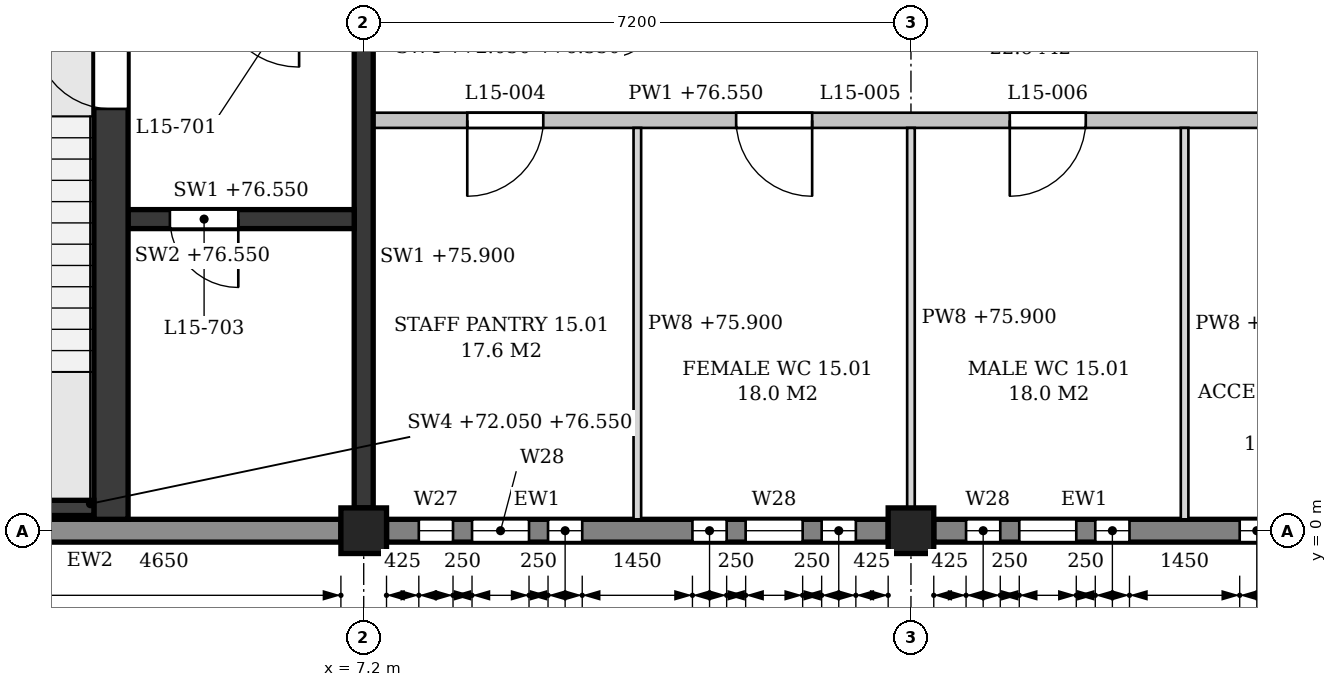
"""IFC4 building model, lengths in metres.
Left out: names, types, materials, properties, quantities, classifications, styles, units other than length and angle.
Written with IfcOpenShell. Run it as: python <this file> out.ifc"""

import sys

from ifc_helpers import new_model, si_unit, direction, frame, frame_2d, origin, origin_2d, place, context, subcontext, project, spatial, polyline, rectangle, outline, extrude, element, fill, save


model = new_model("IFC4")
c1 = context("Model", 3, precision=1e-05, world=origin(), true_north=direction((0.0, 1.0)))
c2 = subcontext(c1, "Body", "Model", "MODEL_VIEW")
j1 = project(units=[si_unit("LENGTHUNIT", "METRE"), si_unit("PLANEANGLEUNIT", "RADIAN")], contexts=[c1])
p1 = place(None, origin())
s1 = spatial("IfcSite", under=j1, at=p1, CompositionType="ELEMENT")
p2 = place(p1, origin())
s2 = spatial("IfcBuilding", under=s1, at=p2, CompositionType="ELEMENT")
p3 = place(p2, frame((0.0, 0.0, 72.3)))
s3 = spatial("IfcBuildingStorey", under=s2, at=p3, CompositionType="ELEMENT", Elevation=72.3)
for number, where, z_axis, x_axis in (
    (1, (7.2, 0.0, 0.0), (0.0, 0.0, 1.0), (1.0, 0.0, 0.0)),
    (2, (14.4, 0.0, 0.0), (0.0, 0.0, 1.0), (1.0, 0.0, 0.0)),
):
    element("IfcColumn", number, at=place(p3, frame(where, z_axis=z_axis, x_axis=x_axis)), inside=s3, PredefinedType="COLUMN", context=c2, shape_type="SweptSolid", body=[
        extrude(rectangle(XDim=0.6, YDim=0.6, at=origin_2d()), origin(), (0.0, 0.0, 1.0), 4.5),
    ])
p4 = place(p3, frame((0.3, 0.0, 0.0), z_axis=(0.0, 0.0, 1.0), x_axis=(1.0, 0.0, 0.0)))
e3 = element("IfcWall", 3, at=p4, inside=s3, PredefinedType="STANDARD", context=c2, shape_type="SweptSolid", body=[
    extrude(rectangle(XDim=6.6, YDim=0.3, at=frame_2d((3.3, 0.0))), origin(), (0.0, 0.0, 1.0), 3.65),
])
p5 = place(p4, frame((1.05, 0.0, 0.9)))
e4 = element("IfcOpeningElement", 4, at=p5, cuts=e3, PredefinedType="OPENING", context=c2, shape_type="SweptSolid", body=[
    extrude(outline(polyline([(0.0, 0.0), (0.9, 0.0), (0.9, 2.25), (0.45, 2.7), (0.0, 2.25), (0.0, 0.0)])), frame((0.0, 0.16, 0.0), z_axis=(0.0, -1.0, 0.0), x_axis=(1.0, 0.0, 0.0)), (0.0, 0.0, 1.0), 0.32),
])
p6 = place(p3, frame((7.5, 0.0, 0.0), z_axis=(0.0, 0.0, 1.0), x_axis=(1.0, 0.0, 0.0)))
e5 = element("IfcWall", 5, at=p6, inside=s3, PredefinedType="STANDARD", context=c2, shape_type="SweptSolid", body=[
    extrude(rectangle(XDim=6.6, YDim=0.3, at=frame_2d((3.3, 0.0))), origin(), (0.0, 0.0, 1.0), 3.65),
])
p7 = place(p6, frame((0.425, 0.0, 1.5)))
e6 = element("IfcOpeningElement", 6, at=p7, cuts=e5, PredefinedType="OPENING", context=c2, shape_type="SweptSolid", body=[
    extrude(outline(polyline([(0.0, 0.0), (0.45, 0.0), (0.45, 1.85), (0.225, 2.1), (0.0, 1.85), (0.0, 0.0)])), frame((0.0, 0.16, 0.0), z_axis=(0.0, -1.0, 0.0), x_axis=(1.0, 0.0, 0.0)), (0.0, 0.0, 1.0), 0.32),
])
p8 = place(p6, frame((1.125, 0.0, 0.9)))
e7 = element("IfcOpeningElement", 7, at=p8, cuts=e5, PredefinedType="OPENING", context=c2, shape_type="SweptSolid", body=[
    extrude(outline(polyline([(0.0, 0.0), (0.75, 0.0), (0.75, 2.25), (0.375, 2.7), (0.0, 2.25), (0.0, 0.0)])), frame((0.0, 0.16, 0.0), z_axis=(0.0, -1.0, 0.0), x_axis=(1.0, 0.0, 0.0)), (0.0, 0.0, 1.0), 0.32),
])
p9 = place(p6, frame((2.125, 0.0, 1.5)))
e8 = element("IfcOpeningElement", 8, at=p9, cuts=e5, PredefinedType="OPENING", context=c2, shape_type="SweptSolid", body=[
    extrude(outline(polyline([(0.0, 0.0), (0.45, 0.0), (0.45, 1.85), (0.225, 2.1), (0.0, 1.85), (0.0, 0.0)])), frame((0.0, 0.16, 0.0), z_axis=(0.0, -1.0, 0.0), x_axis=(1.0, 0.0, 0.0)), (0.0, 0.0, 1.0), 0.32),
])
p10 = place(p6, frame((4.025, 0.0, 1.5)))
e9 = element("IfcOpeningElement", 9, at=p10, cuts=e5, PredefinedType="OPENING", context=c2, shape_type="SweptSolid", body=[
    extrude(outline(polyline([(0.0, 0.0), (0.45, 0.0), (0.45, 1.85), (0.225, 2.1), (0.0, 1.85), (0.0, 0.0)])), frame((0.0, 0.16, 0.0), z_axis=(0.0, -1.0, 0.0), x_axis=(1.0, 0.0, 0.0)), (0.0, 0.0, 1.0), 0.32),
])
p11 = place(p6, frame((4.725, 0.0, 0.9)))
e10 = element("IfcOpeningElement", 10, at=p11, cuts=e5, PredefinedType="OPENING", context=c2, shape_type="SweptSolid", body=[
    extrude(outline(polyline([(0.0, 0.0), (0.75, 0.0), (0.75, 2.25), (0.375, 2.7), (0.0, 2.25), (0.0, 0.0)])), frame((0.0, 0.16, 0.0), z_axis=(0.0, -1.0, 0.0), x_axis=(1.0, 0.0, 0.0)), (0.0, 0.0, 1.0), 0.32),
])
p12 = place(p6, frame((5.725, 0.0, 1.5)))
e11 = element("IfcOpeningElement", 11, at=p12, cuts=e5, PredefinedType="OPENING", context=c2, shape_type="SweptSolid", body=[
    extrude(outline(polyline([(0.0, 0.0), (0.45, 0.0), (0.45, 1.85), (0.225, 2.1), (0.0, 1.85), (0.0, 0.0)])), frame((0.0, 0.16, 0.0), z_axis=(0.0, -1.0, 0.0), x_axis=(1.0, 0.0, 0.0)), (0.0, 0.0, 1.0), 0.32),
])
p13 = place(p3, frame((14.7, 0.0, 0.0), z_axis=(0.0, 0.0, 1.0), x_axis=(1.0, 0.0, 0.0)))
e12 = element("IfcWall", 12, at=p13, inside=s3, PredefinedType="STANDARD", context=c2, shape_type="SweptSolid", body=[
    extrude(rectangle(XDim=6.6, YDim=0.3, at=frame_2d((3.3, 0.0))), origin(), (0.0, 0.0, 1.0), 3.65),
])
p14 = place(p13, frame((0.425, 0.0, 1.5)))
e13 = element("IfcOpeningElement", 13, at=p14, cuts=e12, PredefinedType="OPENING", context=c2, shape_type="SweptSolid", body=[
    extrude(outline(polyline([(0.0, 0.0), (0.45, 0.0), (0.45, 1.85), (0.225, 2.1), (0.0, 1.85), (0.0, 0.0)])), frame((0.0, 0.16, 0.0), z_axis=(0.0, -1.0, 0.0), x_axis=(1.0, 0.0, 0.0)), (0.0, 0.0, 1.0), 0.32),
])
p15 = place(p13, frame((1.125, 0.0, 0.9)))
e14 = element("IfcOpeningElement", 14, at=p15, cuts=e12, PredefinedType="OPENING", context=c2, shape_type="SweptSolid", body=[
    extrude(outline(polyline([(0.0, 0.0), (0.75, 0.0), (0.75, 2.25), (0.375, 2.7), (0.0, 2.25), (0.0, 0.0)])), frame((0.0, 0.16, 0.0), z_axis=(0.0, -1.0, 0.0), x_axis=(1.0, 0.0, 0.0)), (0.0, 0.0, 1.0), 0.32),
])
p16 = place(p13, frame((2.125, 0.0, 1.5)))
e15 = element("IfcOpeningElement", 15, at=p16, cuts=e12, PredefinedType="OPENING", context=c2, shape_type="SweptSolid", body=[
    extrude(outline(polyline([(0.0, 0.0), (0.45, 0.0), (0.45, 1.85), (0.225, 2.1), (0.0, 1.85), (0.0, 0.0)])), frame((0.0, 0.16, 0.0), z_axis=(0.0, -1.0, 0.0), x_axis=(1.0, 0.0, 0.0)), (0.0, 0.0, 1.0), 0.32),
])
p17 = place(p13, frame((4.025, 0.0, 1.5)))
e16 = element("IfcOpeningElement", 16, at=p17, cuts=e12, PredefinedType="OPENING", context=c2, shape_type="SweptSolid", body=[
    extrude(outline(polyline([(0.0, 0.0), (0.45, 0.0), (0.45, 1.85), (0.225, 2.1), (0.0, 1.85), (0.0, 0.0)])), frame((0.0, 0.16, 0.0), z_axis=(0.0, -1.0, 0.0), x_axis=(1.0, 0.0, 0.0)), (0.0, 0.0, 1.0), 0.32),
])
p18 = place(p13, frame((4.725, 0.0, 0.9)))
e17 = element("IfcOpeningElement", 17, at=p18, cuts=e12, PredefinedType="OPENING", context=c2, shape_type="SweptSolid", body=[
    extrude(outline(polyline([(0.0, 0.0), (0.75, 0.0), (0.75, 2.25), (0.375, 2.7), (0.0, 2.25), (0.0, 0.0)])), frame((0.0, 0.16, 0.0), z_axis=(0.0, -1.0, 0.0), x_axis=(1.0, 0.0, 0.0)), (0.0, 0.0, 1.0), 0.32),
])
p19 = place(p13, frame((5.725, 0.0, 1.5)))
e18 = element("IfcOpeningElement", 18, at=p19, cuts=e12, PredefinedType="OPENING", context=c2, shape_type="SweptSolid", body=[
    extrude(outline(polyline([(0.0, 0.0), (0.45, 0.0), (0.45, 1.85), (0.225, 2.1), (0.0, 1.85), (0.0, 0.0)])), frame((0.0, 0.16, 0.0), z_axis=(0.0, -1.0, 0.0), x_axis=(1.0, 0.0, 0.0)), (0.0, 0.0, 1.0), 0.32),
])
p20 = place(p3, frame((7.2, 0.3, 0.0), z_axis=(0.0, 0.0, 1.0), x_axis=(0.0, 1.0, 0.0)))
e19 = element("IfcWall", 19, at=p20, inside=s3, PredefinedType="SHEAR", context=c2, shape_type="SweptSolid", body=[
    extrude(rectangle(XDim=6.6, YDim=0.25, at=frame_2d((3.3, 0.0))), origin(), (0.0, 0.0, 1.0), 3.6),
])
p21 = place(p3, frame((2.25, 0.3, -0.25), z_axis=(0.0, 0.0, 1.0), x_axis=(1.0, 0.0, 0.0)))
e20 = element("IfcWall", 20, at=p21, inside=s3, PredefinedType="SHEAR", context=c2, shape_type="SweptSolid", body=[
    extrude(rectangle(XDim=1.4, YDim=0.2, at=frame_2d((0.7, 0.0))), origin(), (0.0, 0.0, 1.0), 4.5),
])
p22 = place(p3, frame((3.875, 0.15, 0.0), z_axis=(0.0, 0.0, 1.0), x_axis=(0.0, 1.0, 0.0)))
e21 = element("IfcWall", 21, at=p22, inside=s3, PredefinedType="SHEAR", context=c2, shape_type="SweptSolid", body=[
    extrude(rectangle(XDim=6.925, YDim=0.45, at=frame_2d((3.462, 0.0))), origin(), (0.0, 0.0, 1.0), 4.25),
])
p23 = place(p22, frame((5.4, 0.0, 0.0)))
e22 = element("IfcOpeningElement", 22, at=p23, cuts=e21, PredefinedType="OPENING", context=c2, shape_type="SweptSolid", body=[
    extrude(rectangle(XDim=1.0, YDim=2.1, at=frame_2d((0.5, 1.05))), frame((0.0, 0.235, 0.0), z_axis=(0.0, -1.0, 0.0), x_axis=(1.0, 0.0, 0.0)), (0.0, 0.0, 1.0), 0.47),
])
p24 = place(p3, frame((4.1, 4.1, 0.0), z_axis=(0.0, 0.0, 1.0), x_axis=(1.0, 0.0, 0.0)))
e23 = element("IfcWall", 23, at=p24, inside=s3, PredefinedType="SHEAR", context=c2, shape_type="SweptSolid", body=[
    extrude(rectangle(XDim=2.975, YDim=0.25, at=frame_2d((1.487, 0.0))), origin(), (0.0, 0.0, 1.0), 4.25),
])
p25 = place(p24, frame((0.55, 0.0, 0.0)))
e24 = element("IfcOpeningElement", 24, at=p25, cuts=e23, PredefinedType="OPENING", context=c2, shape_type="SweptSolid", body=[
    extrude(rectangle(XDim=0.9, YDim=2.1, at=frame_2d((0.45, 1.05))), frame((0.0, 0.135, 0.0), z_axis=(0.0, -1.0, 0.0), x_axis=(1.0, 0.0, 0.0)), (0.0, 0.0, 1.0), 0.27),
])
p26 = place(p3, frame((7.325, 5.4, 0.0), z_axis=(0.0, 0.0, 1.0), x_axis=(1.0, 0.0, 0.0)))
e25 = element("IfcWall", 25, at=p26, inside=s3, PredefinedType="PARTITIONING", context=c2, shape_type="SweptSolid", body=[
    extrude(outline(polyline([(0.0, 0.0), (14.15, 0.0), (14.15, 3.6), (14.075, 3.6), (14.075, 4.25), (7.275, 4.25), (7.275, 3.6), (6.875, 3.6), (6.875, 4.25), (0.075, 4.25), (0.075, 3.6), (0.0, 3.6), (0.0, 0.0)])), frame((0.0, 0.1, 0.0), z_axis=(0.0, -1.0, 0.0), x_axis=(1.0, 0.0, 0.0)), (0.0, 0.0, 1.0), 0.2),
])
p27 = place(p26, frame((1.238, 0.0, 0.0)))
e26 = element("IfcOpeningElement", 26, at=p27, cuts=e25, PredefinedType="OPENING", context=c2, shape_type="SweptSolid", body=[
    extrude(rectangle(XDim=1.0, YDim=2.1, at=frame_2d((0.5, 1.05))), frame((0.0, 0.11, 0.0), z_axis=(0.0, -1.0, 0.0), x_axis=(1.0, 0.0, 0.0)), (0.0, 0.0, 1.0), 0.22),
])
p28 = place(p26, frame((4.775, 0.0, 0.0)))
e27 = element("IfcOpeningElement", 27, at=p28, cuts=e25, PredefinedType="OPENING", context=c2, shape_type="SweptSolid", body=[
    extrude(rectangle(XDim=1.0, YDim=2.1, at=frame_2d((0.5, 1.05))), frame((0.0, 0.11, 0.0), z_axis=(0.0, -1.0, 0.0), x_axis=(1.0, 0.0, 0.0)), (0.0, 0.0, 1.0), 0.22),
])
p29 = place(p26, frame((8.375, 0.0, 0.0)))
e28 = element("IfcOpeningElement", 28, at=p29, cuts=e25, PredefinedType="OPENING", context=c2, shape_type="SweptSolid", body=[
    extrude(rectangle(XDim=1.0, YDim=2.1, at=frame_2d((0.5, 1.05))), frame((0.0, 0.11, 0.0), z_axis=(0.0, -1.0, 0.0), x_axis=(1.0, 0.0, 0.0)), (0.0, 0.0, 1.0), 0.22),
])
p30 = place(p26, frame((11.913, 0.0, 0.0)))
e29 = element("IfcOpeningElement", 29, at=p30, cuts=e25, PredefinedType="OPENING", context=c2, shape_type="SweptSolid", body=[
    extrude(rectangle(XDim=1.0, YDim=2.1, at=frame_2d((0.5, 1.05))), frame((0.0, 0.11, 0.0), z_axis=(0.0, -1.0, 0.0), x_axis=(1.0, 0.0, 0.0)), (0.0, 0.0, 1.0), 0.22),
])
p31 = place(p3, frame((10.8, 0.15, 0.0), z_axis=(0.0, 0.0, 1.0), x_axis=(0.0, 1.0, 0.0)))
e30 = element("IfcWall", 30, at=p31, inside=s3, PredefinedType="PARTITIONING", context=c2, shape_type="SweptSolid", body=[
    extrude(rectangle(XDim=5.15, YDim=0.1, at=frame_2d((2.575, 0.0))), origin(), (0.0, 0.0, 1.0), 3.6),
])
p32 = place(p3, frame((14.4, 0.3, 0.0), z_axis=(0.0, 0.0, 1.0), x_axis=(0.0, 1.0, 0.0)))
e31 = element("IfcWall", 31, at=p32, inside=s3, PredefinedType="PARTITIONING", context=c2, shape_type="SweptSolid", body=[
    extrude(rectangle(XDim=5.0, YDim=0.1, at=frame_2d((2.5, 0.0))), origin(), (0.0, 0.0, 1.0), 3.6),
])
p33 = place(p3, frame((18.0, 0.15, 0.0), z_axis=(0.0, 0.0, 1.0), x_axis=(0.0, 1.0, 0.0)))
e32 = element("IfcWall", 32, at=p33, inside=s3, PredefinedType="PARTITIONING", context=c2, shape_type="SweptSolid", body=[
    extrude(rectangle(XDim=5.15, YDim=0.1, at=frame_2d((2.575, 0.0))), origin(), (0.0, 0.0, 1.0), 3.6),
])
p34 = place(p7, origin())
e33 = element("IfcWindow", 33, at=p34, inside=s3, PartitioningType="SINGLE_PANEL", PredefinedType="WINDOW", context=c2, shape_type="SweptSolid", body=[
    extrude(outline(polyline([(0.0, 0.0), (0.45, 0.0), (0.45, 1.85), (0.225, 2.1), (0.0, 1.85), (0.0, 0.0)])), frame((0.0, 0.03, 0.0), z_axis=(0.0, -1.0, 0.0), x_axis=(1.0, 0.0, 0.0)), (0.0, 0.0, 1.0), 0.06),
])
fill(e6, e33)
p35 = place(p8, origin())
e34 = element("IfcWindow", 34, at=p35, inside=s3, PartitioningType="SINGLE_PANEL", PredefinedType="WINDOW", context=c2, shape_type="SweptSolid", body=[
    extrude(outline(polyline([(0.0, 0.0), (0.75, 0.0), (0.75, 2.25), (0.375, 2.7), (0.0, 2.25), (0.0, 0.0)])), frame((0.0, 0.03, 0.0), z_axis=(0.0, -1.0, 0.0), x_axis=(1.0, 0.0, 0.0)), (0.0, 0.0, 1.0), 0.06),
])
fill(e7, e34)
p36 = place(p9, origin())
e35 = element("IfcWindow", 35, at=p36, inside=s3, PartitioningType="SINGLE_PANEL", PredefinedType="WINDOW", context=c2, shape_type="SweptSolid", body=[
    extrude(outline(polyline([(0.0, 0.0), (0.45, 0.0), (0.45, 1.85), (0.225, 2.1), (0.0, 1.85), (0.0, 0.0)])), frame((0.0, 0.03, 0.0), z_axis=(0.0, -1.0, 0.0), x_axis=(1.0, 0.0, 0.0)), (0.0, 0.0, 1.0), 0.06),
])
fill(e8, e35)
p37 = place(p10, origin())
e36 = element("IfcWindow", 36, at=p37, inside=s3, PartitioningType="SINGLE_PANEL", PredefinedType="WINDOW", context=c2, shape_type="SweptSolid", body=[
    extrude(outline(polyline([(0.0, 0.0), (0.45, 0.0), (0.45, 1.85), (0.225, 2.1), (0.0, 1.85), (0.0, 0.0)])), frame((0.0, 0.03, 0.0), z_axis=(0.0, -1.0, 0.0), x_axis=(1.0, 0.0, 0.0)), (0.0, 0.0, 1.0), 0.06),
])
fill(e9, e36)
p38 = place(p11, origin())
e37 = element("IfcWindow", 37, at=p38, inside=s3, PartitioningType="SINGLE_PANEL", PredefinedType="WINDOW", context=c2, shape_type="SweptSolid", body=[
    extrude(outline(polyline([(0.0, 0.0), (0.75, 0.0), (0.75, 2.25), (0.375, 2.7), (0.0, 2.25), (0.0, 0.0)])), frame((0.0, 0.03, 0.0), z_axis=(0.0, -1.0, 0.0), x_axis=(1.0, 0.0, 0.0)), (0.0, 0.0, 1.0), 0.06),
])
fill(e10, e37)
p39 = place(p12, origin())
e38 = element("IfcWindow", 38, at=p39, inside=s3, PartitioningType="SINGLE_PANEL", PredefinedType="WINDOW", context=c2, shape_type="SweptSolid", body=[
    extrude(outline(polyline([(0.0, 0.0), (0.45, 0.0), (0.45, 1.85), (0.225, 2.1), (0.0, 1.85), (0.0, 0.0)])), frame((0.0, 0.03, 0.0), z_axis=(0.0, -1.0, 0.0), x_axis=(1.0, 0.0, 0.0)), (0.0, 0.0, 1.0), 0.06),
])
fill(e11, e38)
p40 = place(p14, origin())
e39 = element("IfcWindow", 39, at=p40, inside=s3, PartitioningType="SINGLE_PANEL", PredefinedType="WINDOW", context=c2, shape_type="SweptSolid", body=[
    extrude(outline(polyline([(0.0, 0.0), (0.45, 0.0), (0.45, 1.85), (0.225, 2.1), (0.0, 1.85), (0.0, 0.0)])), frame((0.0, 0.03, 0.0), z_axis=(0.0, -1.0, 0.0), x_axis=(1.0, 0.0, 0.0)), (0.0, 0.0, 1.0), 0.06),
])
fill(e13, e39)
p41 = place(p15, origin())
e40 = element("IfcWindow", 40, at=p41, inside=s3, PartitioningType="SINGLE_PANEL", PredefinedType="WINDOW", context=c2, shape_type="SweptSolid", body=[
    extrude(outline(polyline([(0.0, 0.0), (0.75, 0.0), (0.75, 2.25), (0.375, 2.7), (0.0, 2.25), (0.0, 0.0)])), frame((0.0, 0.03, 0.0), z_axis=(0.0, -1.0, 0.0), x_axis=(1.0, 0.0, 0.0)), (0.0, 0.0, 1.0), 0.06),
])
fill(e14, e40)
p42 = place(p16, origin())
e41 = element("IfcWindow", 41, at=p42, inside=s3, PartitioningType="SINGLE_PANEL", PredefinedType="WINDOW", context=c2, shape_type="SweptSolid", body=[
    extrude(outline(polyline([(0.0, 0.0), (0.45, 0.0), (0.45, 1.85), (0.225, 2.1), (0.0, 1.85), (0.0, 0.0)])), frame((0.0, 0.03, 0.0), z_axis=(0.0, -1.0, 0.0), x_axis=(1.0, 0.0, 0.0)), (0.0, 0.0, 1.0), 0.06),
])
fill(e15, e41)
p43 = place(p17, origin())
e42 = element("IfcWindow", 42, at=p43, inside=s3, PartitioningType="SINGLE_PANEL", PredefinedType="WINDOW", context=c2, shape_type="SweptSolid", body=[
    extrude(outline(polyline([(0.0, 0.0), (0.45, 0.0), (0.45, 1.85), (0.225, 2.1), (0.0, 1.85), (0.0, 0.0)])), frame((0.0, 0.03, 0.0), z_axis=(0.0, -1.0, 0.0), x_axis=(1.0, 0.0, 0.0)), (0.0, 0.0, 1.0), 0.06),
])
fill(e16, e42)
p44 = place(p23, origin())
e43 = element("IfcDoor", 43, at=p44, inside=s3, OperationType="SINGLE_SWING_RIGHT", PredefinedType="DOOR", context=c2, shape_type="SweptSolid", body=[
    extrude(rectangle(XDim=1.0, YDim=2.1, at=frame_2d((0.5, 1.05))), frame((0.0, 0.025, 0.0), z_axis=(0.0, -1.0, 0.0), x_axis=(1.0, 0.0, 0.0)), (0.0, 0.0, 1.0), 0.05),
])
fill(e22, e43)
p45 = place(p25, frame((0.9, 0.0, 0.0), z_axis=(0.0, 0.0, 1.0), x_axis=(-1.0, 0.0, 0.0)))
e44 = element("IfcDoor", 44, at=p45, inside=s3, OperationType="SINGLE_SWING_LEFT", PredefinedType="DOOR", context=c2, shape_type="SweptSolid", body=[
    extrude(rectangle(XDim=0.9, YDim=2.1, at=frame_2d((0.45, 1.05))), frame((0.0, 0.025, 0.0), z_axis=(0.0, -1.0, 0.0), x_axis=(1.0, 0.0, 0.0)), (0.0, 0.0, 1.0), 0.05),
])
fill(e24, e44)
p46 = place(p27, frame((1.0, 0.0, 0.0), z_axis=(0.0, 0.0, 1.0), x_axis=(-1.0, 0.0, 0.0)))
e45 = element("IfcDoor", 45, at=p46, inside=s3, OperationType="SINGLE_SWING_RIGHT", PredefinedType="DOOR", context=c2, shape_type="SweptSolid", body=[
    extrude(rectangle(XDim=1.0, YDim=2.1, at=frame_2d((0.5, 1.05))), frame((0.0, 0.025, 0.0), z_axis=(0.0, -1.0, 0.0), x_axis=(1.0, 0.0, 0.0)), (0.0, 0.0, 1.0), 0.05),
])
fill(e26, e45)
p47 = place(p28, frame((1.0, 0.0, 0.0), z_axis=(0.0, 0.0, 1.0), x_axis=(-1.0, 0.0, 0.0)))
e46 = element("IfcDoor", 46, at=p47, inside=s3, OperationType="SINGLE_SWING_LEFT", PredefinedType="DOOR", context=c2, shape_type="SweptSolid", body=[
    extrude(rectangle(XDim=1.0, YDim=2.1, at=frame_2d((0.5, 1.05))), frame((0.0, 0.025, 0.0), z_axis=(0.0, -1.0, 0.0), x_axis=(1.0, 0.0, 0.0)), (0.0, 0.0, 1.0), 0.05),
])
fill(e27, e46)
p48 = place(p29, frame((1.0, 0.0, 0.0), z_axis=(0.0, 0.0, 1.0), x_axis=(-1.0, 0.0, 0.0)))
e47 = element("IfcDoor", 47, at=p48, inside=s3, OperationType="SINGLE_SWING_RIGHT", PredefinedType="DOOR", context=c2, shape_type="SweptSolid", body=[
    extrude(rectangle(XDim=1.0, YDim=2.1, at=frame_2d((0.5, 1.05))), frame((0.0, 0.025, 0.0), z_axis=(0.0, -1.0, 0.0), x_axis=(1.0, 0.0, 0.0)), (0.0, 0.0, 1.0), 0.05),
])
fill(e28, e47)
save(model, sys.argv[1])
